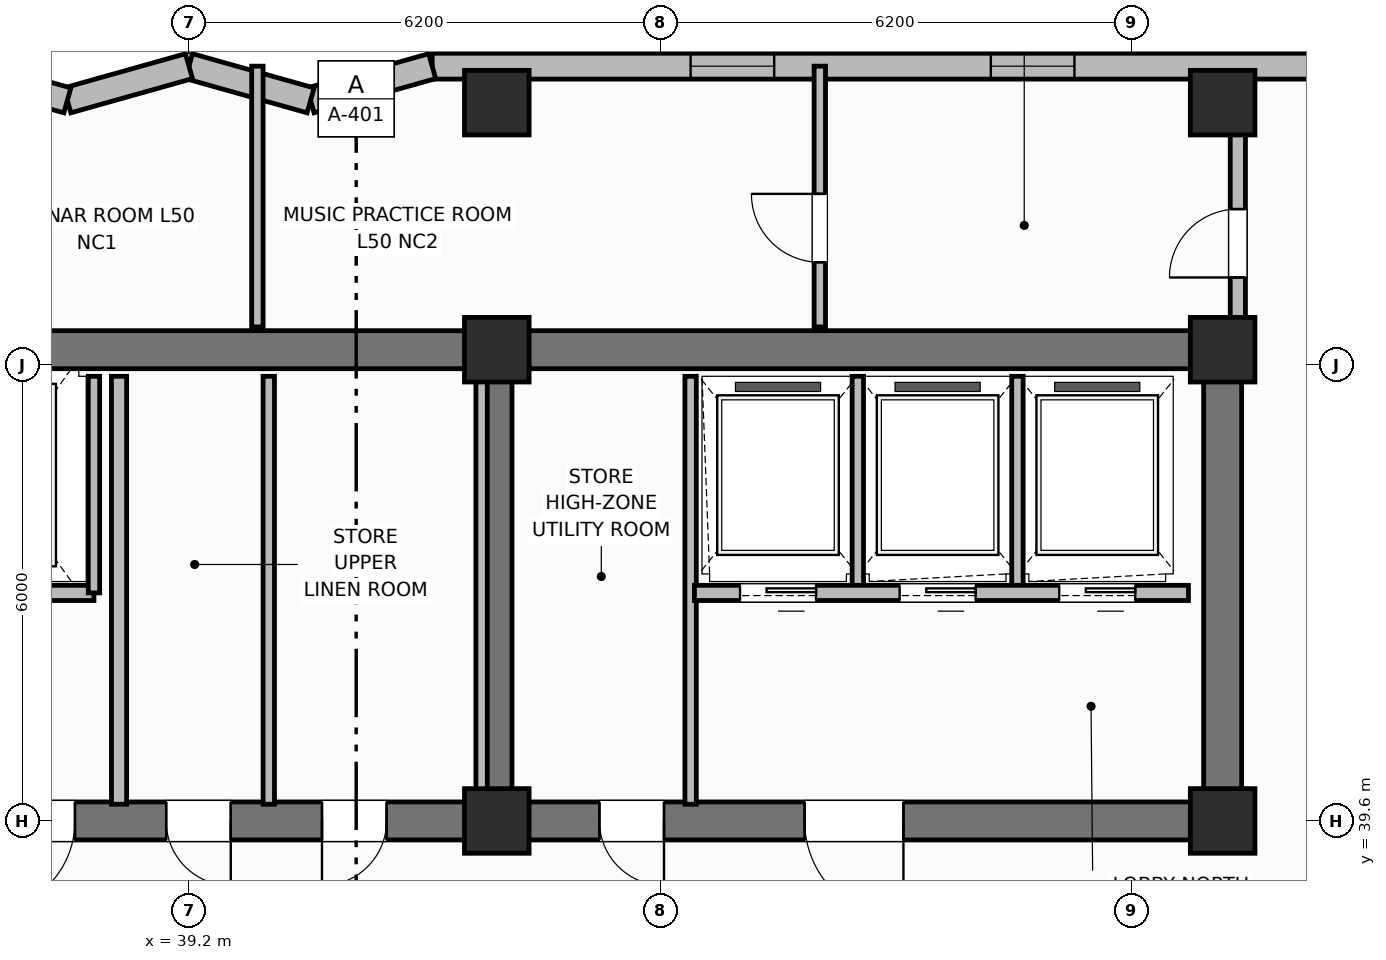
"""IFC4 building model, lengths in metres.
Left out: names, types, materials, properties, quantities, classifications, styles, units other than length and angle.
Written with IfcOpenShell. Run it as: python <this file> out.ifc"""

import sys

from ifc_helpers import new_model, si_unit, direction, frame, frame_2d, origin, origin_2d, place, context, subcontext, project, spatial, rectangle, extrude, element, fill, save


model = new_model("IFC4")
c1 = context("Model", 3, precision=1e-05, world=origin(), true_north=direction((0.0, 1.0)))
c2 = subcontext(c1, "Body", "Model", "MODEL_VIEW")
j1 = project(units=[si_unit("LENGTHUNIT", "METRE"), si_unit("PLANEANGLEUNIT", "RADIAN")], contexts=[c1])
p1 = place(None, origin())
s1 = spatial("IfcSite", under=j1, at=p1, CompositionType="ELEMENT")
p2 = place(p1, origin())
s2 = spatial("IfcBuilding", under=s1, at=p2, CompositionType="ELEMENT")
p3 = place(p2, frame((0.0, 0.0, 203.1)))
s3 = spatial("IfcBuildingStorey", under=s2, at=p3, CompositionType="ELEMENT", Elevation=203.1)
p4 = place(p3, frame((25.6, 45.8, 0.0), z_axis=(0.0, 0.0, 1.0), x_axis=(1.0, 0.0, 0.0)))
e1 = element("IfcWall", 1, at=p4, inside=s3, PredefinedType="SHEAR", context=c2, shape_type="SweptSolid", body=[
    extrude(rectangle(XDim=27.2, YDim=0.5, at=frame_2d((13.6, 0.0))), origin(), (0.0, 0.0, 1.0), 4.2),
])
p5 = place(p3, frame((52.8, 39.85, 0.0), z_axis=(0.0, 0.0, 1.0), x_axis=(0.0, 1.0, 0.0)))
e2 = element("IfcWall", 2, at=p5, inside=s3, PredefinedType="SHEAR", context=c2, shape_type="SweptSolid", body=[
    extrude(rectangle(XDim=5.7, YDim=0.5, at=frame_2d((2.85, 0.0))), origin(), (0.0, 0.0, 1.0), 4.2),
])
p6 = place(p3, frame((52.8, 39.6, 0.0), z_axis=(0.0, 0.0, 1.0), x_axis=(-1.0, 0.0, 0.0)))
e3 = element("IfcWall", 3, at=p6, inside=s3, PredefinedType="SHEAR", context=c2, shape_type="SweptSolid", body=[
    extrude(rectangle(XDim=27.2, YDim=0.5, at=frame_2d((13.6, 0.0))), origin(), (0.0, 0.0, 1.0), 4.2),
])
p7 = place(p6, frame((24.2, 0.0, 0.0)))
e4 = element("IfcOpeningElement", 4, at=p7, cuts=e3, PredefinedType="OPENING", context=c2, shape_type="SweptSolid", body=[
    extrude(rectangle(XDim=1.1, YDim=2.15, at=frame_2d((0.55, 1.075))), frame((0.0, 0.26, 0.0), z_axis=(0.0, -1.0, 0.0), x_axis=(1.0, 0.0, 0.0)), (0.0, 0.0, 1.0), 0.52),
])
p8 = place(p6, frame((20.55, 0.0, 0.0)))
e5 = element("IfcOpeningElement", 5, at=p8, cuts=e3, PredefinedType="OPENING", context=c2, shape_type="SweptSolid", body=[
    extrude(rectangle(XDim=0.95, YDim=2.1, at=frame_2d((0.475, 1.05))), frame((0.0, 0.26, 0.0), z_axis=(0.0, -1.0, 0.0), x_axis=(1.0, 0.0, 0.0)), (0.0, 0.0, 1.0), 0.52),
])
p9 = place(p6, frame((15.1, 0.0, 0.0)))
e6 = element("IfcOpeningElement", 6, at=p9, cuts=e3, PredefinedType="OPENING", context=c2, shape_type="SweptSolid", body=[
    extrude(rectangle(XDim=1.2, YDim=2.15, at=frame_2d((0.6, 1.075))), frame((0.0, 0.26, 0.0), z_axis=(0.0, -1.0, 0.0), x_axis=(1.0, 0.0, 0.0)), (0.0, 0.0, 1.0), 0.52),
])
p10 = place(p6, frame((13.05, 0.0, 0.0)))
e7 = element("IfcOpeningElement", 7, at=p10, cuts=e3, PredefinedType="OPENING", context=c2, shape_type="SweptSolid", body=[
    extrude(rectangle(XDim=0.85, YDim=2.1, at=frame_2d((0.425, 1.05))), frame((0.0, 0.26, 0.0), z_axis=(0.0, -1.0, 0.0), x_axis=(1.0, 0.0, 0.0)), (0.0, 0.0, 1.0), 0.52),
])
p11 = place(p6, frame((11.0, 0.0, 0.0)))
e8 = element("IfcOpeningElement", 8, at=p11, cuts=e3, PredefinedType="OPENING", context=c2, shape_type="SweptSolid", body=[
    extrude(rectangle(XDim=0.85, YDim=2.1, at=frame_2d((0.425, 1.05))), frame((0.0, 0.26, 0.0), z_axis=(0.0, -1.0, 0.0), x_axis=(1.0, 0.0, 0.0)), (0.0, 0.0, 1.0), 0.52),
])
p12 = place(p6, frame((7.35, 0.0, 0.0)))
e9 = element("IfcOpeningElement", 9, at=p12, cuts=e3, PredefinedType="OPENING", context=c2, shape_type="SweptSolid", body=[
    extrude(rectangle(XDim=0.85, YDim=2.1, at=frame_2d((0.425, 1.05))), frame((0.0, 0.26, 0.0), z_axis=(0.0, -1.0, 0.0), x_axis=(1.0, 0.0, 0.0)), (0.0, 0.0, 1.0), 0.52),
])
p13 = place(p6, frame((4.2, 0.0, 0.0)))
e10 = element("IfcOpeningElement", 10, at=p13, cuts=e3, PredefinedType="OPENING", context=c2, shape_type="SweptSolid", body=[
    extrude(rectangle(XDim=1.3, YDim=2.2, at=frame_2d((0.65, 1.1))), frame((0.0, 0.26, 0.0), z_axis=(0.0, -1.0, 0.0), x_axis=(1.0, 0.0, 0.0)), (0.0, 0.0, 1.0), 0.52),
])
p14 = place(p3, frame((43.25, 39.85, 0.0), z_axis=(0.0, 0.0, 1.0), x_axis=(0.0, 1.0, 0.0)))
e11 = element("IfcWall", 11, at=p14, inside=s3, PredefinedType="SHEAR", context=c2, shape_type="SweptSolid", body=[
    extrude(rectangle(XDim=5.7, YDim=0.4, at=frame_2d((2.85, 0.0))), origin(), (0.0, 0.0, 1.0), 4.2),
])
for number, where, z_axis, x_axis in (
    (12, (43.25, 39.6, 0.0), (0.0, 0.0, 1.0), (1.0, 0.0, 0.0)),
    (13, (43.25, 45.8, 0.0), (0.0, 0.0, 1.0), (1.0, 0.0, 0.0)),
    (14, (52.8, 39.6, 0.0), (0.0, 0.0, 1.0), (1.0, 0.0, 0.0)),
    (15, (52.8, 45.8, 0.0), (0.0, 0.0, 1.0), (1.0, 0.0, 0.0)),
    (16, (43.25, 49.05, 0.0), (0.0, 0.0, 1.0), (1.0, 0.0, 0.0)),
    (17, (52.8, 49.05, 0.0), (0.0, 0.0, 1.0), (1.0, 0.0, 0.0)),
):
    element("IfcColumn", number, at=place(p3, frame(where, z_axis=z_axis, x_axis=x_axis)), inside=s3, PredefinedType="COLUMN", context=c2, shape_type="SweptSolid", body=[
        extrude(rectangle(XDim=0.85, YDim=0.85, at=origin_2d()), origin(), (0.0, 0.0, 1.0), 4.2),
    ])
p15 = place(p3, frame((58.2, 49.53, 0.0), z_axis=(0.0, 0.0, 1.0), x_axis=(-1.0, 0.0, 0.0)))
e18 = element("IfcWall", 18, at=p15, inside=s3, PredefinedType="SOLIDWALL", context=c2, shape_type="SweptSolid", body=[
    extrude(rectangle(XDim=15.8, YDim=0.34, at=frame_2d((7.9, 0.0))), origin(), (0.0, 0.0, 1.0), 3.22),
])
p16 = place(p15, frame((1.55, 0.0, 0.95)))
e19 = element("IfcOpeningElement", 19, at=p16, cuts=e18, PredefinedType="OPENING", context=c2, shape_type="SweptSolid", body=[
    extrude(rectangle(XDim=1.1, YDim=1.65, at=frame_2d((0.55, 0.825))), frame((0.0, 0.18, 0.0), z_axis=(0.0, -1.0, 0.0), x_axis=(1.0, 0.0, 0.0)), (0.0, 0.0, 1.0), 0.36),
])
p17 = place(p15, frame((7.35, 0.0, 0.95)))
e20 = element("IfcOpeningElement", 20, at=p17, cuts=e18, PredefinedType="OPENING", context=c2, shape_type="SweptSolid", body=[
    extrude(rectangle(XDim=1.1, YDim=1.65, at=frame_2d((0.55, 0.825))), frame((0.0, 0.18, 0.0), z_axis=(0.0, -1.0, 0.0), x_axis=(1.0, 0.0, 0.0)), (0.0, 0.0, 1.0), 0.36),
])
p18 = place(p15, frame((11.3, 0.0, 0.95)))
e21 = element("IfcOpeningElement", 21, at=p18, cuts=e18, PredefinedType="OPENING", context=c2, shape_type="SweptSolid", body=[
    extrude(rectangle(XDim=1.1, YDim=1.65, at=frame_2d((0.55, 0.825))), frame((0.0, 0.18, 0.0), z_axis=(0.0, -1.0, 0.0), x_axis=(1.0, 0.0, 0.0)), (0.0, 0.0, 1.0), 0.36),
])
p19 = place(p3, frame((42.4, 49.53, 0.0), z_axis=(0.0, 0.0, 1.0), x_axis=(-0.962652136636, -0.270741322725, 0.0)))
e22 = element("IfcWall", 22, at=p19, inside=s3, PredefinedType="SOLIDWALL", context=c2, shape_type="SweptSolid", body=[
    extrude(rectangle(XDim=1.662, YDim=0.34, at=frame_2d((0.831, 0.0))), origin(), (0.0, 0.0, 1.0), 3.22),
])
p20 = place(p3, frame((40.8, 49.08, 0.0), z_axis=(0.0, 0.0, 1.0), x_axis=(-0.962662902433, 0.270703040766, 0.0)))
e23 = element("IfcWall", 23, at=p20, inside=s3, PredefinedType="SOLIDWALL", context=c2, shape_type="SweptSolid", body=[
    extrude(rectangle(XDim=1.662, YDim=0.34, at=frame_2d((0.831, 0.0))), origin(), (0.0, 0.0, 1.0), 3.22),
])
p21 = place(p3, frame((39.2, 49.53, 0.0), z_axis=(0.0, 0.0, 1.0), x_axis=(-0.962652136636, -0.270741322725, 0.0)))
e24 = element("IfcWall", 24, at=p21, inside=s3, PredefinedType="SOLIDWALL", context=c2, shape_type="SweptSolid", body=[
    extrude(rectangle(XDim=1.662, YDim=0.34, at=frame_2d((0.831, 0.0))), origin(), (0.0, 0.0, 1.0), 3.22),
])
p22 = place(p3, frame((37.6, 49.08, 0.0), z_axis=(0.0, 0.0, 1.0), x_axis=(-0.962662902433, 0.270703040766, 0.0)))
e25 = element("IfcWall", 25, at=p22, inside=s3, PredefinedType="SOLIDWALL", context=c2, shape_type="SweptSolid", body=[
    extrude(rectangle(XDim=1.662, YDim=0.34, at=frame_2d((0.831, 0.0))), origin(), (0.0, 0.0, 1.0), 3.22),
])
p23 = place(p3, frame((37.95, 42.6, 0.0), z_axis=(0.0, 0.0, 1.0), x_axis=(-1.0, 0.0, 0.0)))
e26 = element("IfcWall", 26, at=p23, inside=s3, PredefinedType="PARTITIONING", context=c2, shape_type="SweptSolid", body=[
    extrude(rectangle(XDim=2.55, YDim=0.2, at=frame_2d((1.275, 0.0))), origin(), (0.0, 0.0, 1.0), 2.82),
])
p24 = place(p23, frame((0.75, 0.0, 0.0)))
e27 = element("IfcOpeningElement", 27, at=p24, cuts=e26, PredefinedType="OPENING", context=c2, shape_type="SweptSolid", body=[
    extrude(rectangle(XDim=1.1, YDim=2.15, at=frame_2d((0.55, 1.075))), frame((0.0, 0.11, 0.0), z_axis=(0.0, -1.0, 0.0), x_axis=(1.0, 0.0, 0.0)), (0.0, 0.0, 1.0), 0.22),
])
p25 = place(p3, frame((37.95, 42.6, 0.0), z_axis=(0.0, 0.0, 1.0), x_axis=(0.0, 1.0, 0.0)))
e28 = element("IfcWall", 28, at=p25, inside=s3, PredefinedType="PARTITIONING", context=c2, shape_type="SweptSolid", body=[
    extrude(rectangle(XDim=2.85, YDim=0.15, at=frame_2d((1.425, 0.0))), origin(), (0.0, 0.0, 1.0), 3.05),
])
p26 = place(p3, frame((38.28, 39.82, 0.0), z_axis=(0.0, 0.0, 1.0), x_axis=(0.0, 1.0, 0.0)))
e29 = element("IfcWall", 29, at=p26, inside=s3, PredefinedType="PARTITIONING", context=c2, shape_type="SweptSolid", body=[
    extrude(rectangle(XDim=5.63, YDim=0.2, at=frame_2d((2.815, 0.0))), origin(), (0.0, 0.0, 1.0), 3.05),
])
for number, where, z_axis, x_axis in (
    (30, (43.05, 39.82, 0.0), (0.0, 0.0, 1.0), (0.0, 1.0, 0.0)),
    (31, (40.25, 39.82, 0.0), (0.0, 0.0, 1.0), (0.0, 1.0, 0.0)),
    (32, (45.8, 39.82, 0.0), (0.0, 0.0, 1.0), (0.0, 1.0, 0.0)),
):
    element("IfcWall", number, at=place(p3, frame(where, z_axis=z_axis, x_axis=x_axis)), inside=s3, PredefinedType="PARTITIONING", context=c2, shape_type="SweptSolid", body=[
        extrude(rectangle(XDim=5.63, YDim=0.15, at=frame_2d((2.815, 0.0))), origin(), (0.0, 0.0, 1.0), 3.05),
    ])
for number, where, z_axis, x_axis in (
    (33, (48.0, 42.65, 0.0), (0.0, 0.0, 1.0), (0.0, 1.0, 0.0)),
    (34, (50.1, 42.65, 0.0), (0.0, 0.0, 1.0), (0.0, 1.0, 0.0)),
):
    element("IfcWall", number, at=place(p3, frame(where, z_axis=z_axis, x_axis=x_axis)), inside=s3, PredefinedType="PARTITIONING", context=c2, shape_type="SweptSolid", body=[
        extrude(rectangle(XDim=2.8, YDim=0.15, at=frame_2d((1.4, 0.0))), origin(), (0.0, 0.0, 1.0), 3.05),
    ])
p27 = place(p3, frame((52.35, 42.6, 0.0), z_axis=(0.0, 0.0, 1.0), x_axis=(-1.0, 0.0, 0.0)))
e35 = element("IfcWall", 35, at=p27, inside=s3, PredefinedType="PARTITIONING", context=c2, shape_type="SweptSolid", body=[
    extrude(rectangle(XDim=6.5, YDim=0.2, at=frame_2d((3.25, 0.0))), origin(), (0.0, 0.0, 1.0), 3.05),
])
p28 = place(p27, frame((4.9, 0.0, 0.0)))
e36 = element("IfcOpeningElement", 36, at=p28, cuts=e35, PredefinedType="OPENING", context=c2, shape_type="SweptSolid", body=[
    extrude(rectangle(XDim=1.0, YDim=2.15, at=frame_2d((0.5, 1.075))), frame((0.0, 0.11, 0.0), z_axis=(0.0, -1.0, 0.0), x_axis=(1.0, 0.0, 0.0)), (0.0, 0.0, 1.0), 0.22),
])
p29 = place(p27, frame((2.8, 0.0, 0.0)))
e37 = element("IfcOpeningElement", 37, at=p29, cuts=e35, PredefinedType="OPENING", context=c2, shape_type="SweptSolid", body=[
    extrude(rectangle(XDim=1.0, YDim=2.15, at=frame_2d((0.5, 1.075))), frame((0.0, 0.11, 0.0), z_axis=(0.0, -1.0, 0.0), x_axis=(1.0, 0.0, 0.0)), (0.0, 0.0, 1.0), 0.22),
])
p30 = place(p27, frame((0.7, 0.0, 0.0)))
e38 = element("IfcOpeningElement", 38, at=p30, cuts=e35, PredefinedType="OPENING", context=c2, shape_type="SweptSolid", body=[
    extrude(rectangle(XDim=1.0, YDim=2.15, at=frame_2d((0.5, 1.075))), frame((0.0, 0.11, 0.0), z_axis=(0.0, -1.0, 0.0), x_axis=(1.0, 0.0, 0.0)), (0.0, 0.0, 1.0), 0.22),
])
p31 = place(p3, frame((40.1, 46.1, 0.0), z_axis=(0.0, 0.0, 1.0), x_axis=(0.0, 1.0, 0.0)))
e39 = element("IfcWall", 39, at=p31, inside=s3, PredefinedType="PARTITIONING", context=c2, shape_type="SweptSolid", body=[
    extrude(rectangle(XDim=3.43, YDim=0.15, at=frame_2d((1.715, 0.0))), origin(), (0.0, 0.0, 1.0), 3.05),
])
p32 = place(p3, frame((47.5, 46.1, 0.0), z_axis=(0.0, 0.0, 1.0), x_axis=(0.0, 1.0, 0.0)))
e40 = element("IfcWall", 40, at=p32, inside=s3, PredefinedType="PARTITIONING", context=c2, shape_type="SweptSolid", body=[
    extrude(rectangle(XDim=3.43, YDim=0.15, at=frame_2d((1.715, 0.0))), origin(), (0.0, 0.0, 1.0), 3.05),
])
p33 = place(p32, frame((0.85, 0.0, 0.0)))
e41 = element("IfcOpeningElement", 41, at=p33, cuts=e40, PredefinedType="OPENING", context=c2, shape_type="SweptSolid", body=[
    extrude(rectangle(XDim=0.9, YDim=2.1, at=frame_2d((0.45, 1.05))), frame((0.0, 0.085, 0.0), z_axis=(0.0, -1.0, 0.0), x_axis=(1.0, 0.0, 0.0)), (0.0, 0.0, 1.0), 0.17),
])
p34 = place(p3, frame((53.0, 46.1, 0.0), z_axis=(0.0, 0.0, 1.0), x_axis=(0.0, 1.0, 0.0)))
e42 = element("IfcWall", 42, at=p34, inside=s3, PredefinedType="PARTITIONING", context=c2, shape_type="SweptSolid", body=[
    extrude(rectangle(XDim=2.68, YDim=0.2, at=frame_2d((1.34, 0.0))), origin(), (0.0, 0.0, 1.0), 3.05),
])
p35 = place(p34, frame((0.65, 0.0, 0.0)))
e43 = element("IfcOpeningElement", 43, at=p35, cuts=e42, PredefinedType="OPENING", context=c2, shape_type="SweptSolid", body=[
    extrude(rectangle(XDim=0.9, YDim=2.1, at=frame_2d((0.45, 1.05))), frame((0.0, 0.11, 0.0), z_axis=(0.0, -1.0, 0.0), x_axis=(1.0, 0.0, 0.0)), (0.0, 0.0, 1.0), 0.22),
])
p36 = place(p17, origin())
e44 = element("IfcWindow", 44, at=p36, inside=s3, PartitioningType="SINGLE_PANEL", PredefinedType="WINDOW", context=c2, shape_type="SweptSolid", body=[
    extrude(rectangle(XDim=1.1, YDim=1.65, at=frame_2d((0.55, 0.825))), frame((0.0, 0.03, 0.0), z_axis=(0.0, -1.0, 0.0), x_axis=(1.0, 0.0, 0.0)), (0.0, 0.0, 1.0), 0.06),
])
fill(e20, e44)
p37 = place(p18, origin())
e45 = element("IfcWindow", 45, at=p37, inside=s3, PartitioningType="SINGLE_PANEL", PredefinedType="WINDOW", context=c2, shape_type="SweptSolid", body=[
    extrude(rectangle(XDim=1.1, YDim=1.65, at=frame_2d((0.55, 0.825))), frame((0.0, 0.03, 0.0), z_axis=(0.0, -1.0, 0.0), x_axis=(1.0, 0.0, 0.0)), (0.0, 0.0, 1.0), 0.06),
])
fill(e21, e45)
p38 = place(p28, origin())
e46 = element("IfcDoor", 46, at=p38, inside=s3, OperationType="SLIDING_TO_LEFT", PredefinedType="DOOR", context=c2, shape_type="SweptSolid", body=[
    extrude(rectangle(XDim=1.0, YDim=2.15, at=frame_2d((0.5, 1.075))), frame((0.0, 0.025, 0.0), z_axis=(0.0, -1.0, 0.0), x_axis=(1.0, 0.0, 0.0)), (0.0, 0.0, 1.0), 0.05),
])
fill(e36, e46)
p39 = place(p29, origin())
e47 = element("IfcDoor", 47, at=p39, inside=s3, OperationType="SLIDING_TO_LEFT", PredefinedType="DOOR", context=c2, shape_type="SweptSolid", body=[
    extrude(rectangle(XDim=1.0, YDim=2.15, at=frame_2d((0.5, 1.075))), frame((0.0, 0.025, 0.0), z_axis=(0.0, -1.0, 0.0), x_axis=(1.0, 0.0, 0.0)), (0.0, 0.0, 1.0), 0.05),
])
fill(e37, e47)
p40 = place(p30, origin())
e48 = element("IfcDoor", 48, at=p40, inside=s3, OperationType="SLIDING_TO_LEFT", PredefinedType="DOOR", context=c2, shape_type="SweptSolid", body=[
    extrude(rectangle(XDim=1.0, YDim=2.15, at=frame_2d((0.5, 1.075))), frame((0.0, 0.025, 0.0), z_axis=(0.0, -1.0, 0.0), x_axis=(1.0, 0.0, 0.0)), (0.0, 0.0, 1.0), 0.05),
])
fill(e38, e48)
p41 = place(p33, origin())
e49 = element("IfcDoor", 49, at=p41, inside=s3, OperationType="SINGLE_SWING_RIGHT", PredefinedType="DOOR", context=c2, shape_type="SweptSolid", body=[
    extrude(rectangle(XDim=0.9, YDim=2.1, at=frame_2d((0.45, 1.05))), frame((0.0, 0.025, 0.0), z_axis=(0.0, -1.0, 0.0), x_axis=(1.0, 0.0, 0.0)), (0.0, 0.0, 1.0), 0.05),
])
fill(e41, e49)
p42 = place(p35, origin())
e50 = element("IfcDoor", 50, at=p42, inside=s3, OperationType="SINGLE_SWING_LEFT", PredefinedType="DOOR", context=c2, shape_type="SweptSolid", body=[
    extrude(rectangle(XDim=0.9, YDim=2.1, at=frame_2d((0.45, 1.05))), frame((0.0, 0.025, 0.0), z_axis=(0.0, -1.0, 0.0), x_axis=(1.0, 0.0, 0.0)), (0.0, 0.0, 1.0), 0.05),
])
fill(e43, e50)
p43 = place(p9, origin())
e51 = element("IfcDoor", 51, at=p43, inside=s3, OperationType="SINGLE_SWING_RIGHT", PredefinedType="DOOR", context=c2, shape_type="SweptSolid", body=[
    extrude(rectangle(XDim=1.2, YDim=2.15, at=frame_2d((0.6, 1.075))), frame((0.0, 0.025, 0.0), z_axis=(0.0, -1.0, 0.0), x_axis=(1.0, 0.0, 0.0)), (0.0, 0.0, 1.0), 0.05),
])
fill(e6, e51)
p44 = place(p10, origin())
e52 = element("IfcDoor", 52, at=p44, inside=s3, OperationType="SINGLE_SWING_LEFT", PredefinedType="DOOR", context=c2, shape_type="SweptSolid", body=[
    extrude(rectangle(XDim=0.85, YDim=2.1, at=frame_2d((0.425, 1.05))), frame((0.0, 0.025, 0.0), z_axis=(0.0, -1.0, 0.0), x_axis=(1.0, 0.0, 0.0)), (0.0, 0.0, 1.0), 0.05),
])
fill(e7, e52)
p45 = place(p11, origin())
e53 = element("IfcDoor", 53, at=p45, inside=s3, OperationType="SINGLE_SWING_RIGHT", PredefinedType="DOOR", context=c2, shape_type="SweptSolid", body=[
    extrude(rectangle(XDim=0.85, YDim=2.1, at=frame_2d((0.425, 1.05))), frame((0.0, 0.025, 0.0), z_axis=(0.0, -1.0, 0.0), x_axis=(1.0, 0.0, 0.0)), (0.0, 0.0, 1.0), 0.05),
])
fill(e8, e53)
p46 = place(p12, origin())
e54 = element("IfcDoor", 54, at=p46, inside=s3, OperationType="SINGLE_SWING_LEFT", PredefinedType="DOOR", context=c2, shape_type="SweptSolid", body=[
    extrude(rectangle(XDim=0.85, YDim=2.1, at=frame_2d((0.425, 1.05))), frame((0.0, 0.025, 0.0), z_axis=(0.0, -1.0, 0.0), x_axis=(1.0, 0.0, 0.0)), (0.0, 0.0, 1.0), 0.05),
])
fill(e9, e54)
p47 = place(p13, origin())
e55 = element("IfcDoor", 55, at=p47, inside=s3, OperationType="SINGLE_SWING_LEFT", PredefinedType="DOOR", context=c2, shape_type="SweptSolid", body=[
    extrude(rectangle(XDim=1.3, YDim=2.2, at=frame_2d((0.65, 1.1))), frame((0.0, 0.025, 0.0), z_axis=(0.0, -1.0, 0.0), x_axis=(1.0, 0.0, 0.0)), (0.0, 0.0, 1.0), 0.05),
])
fill(e10, e55)
save(model, sys.argv[1])
